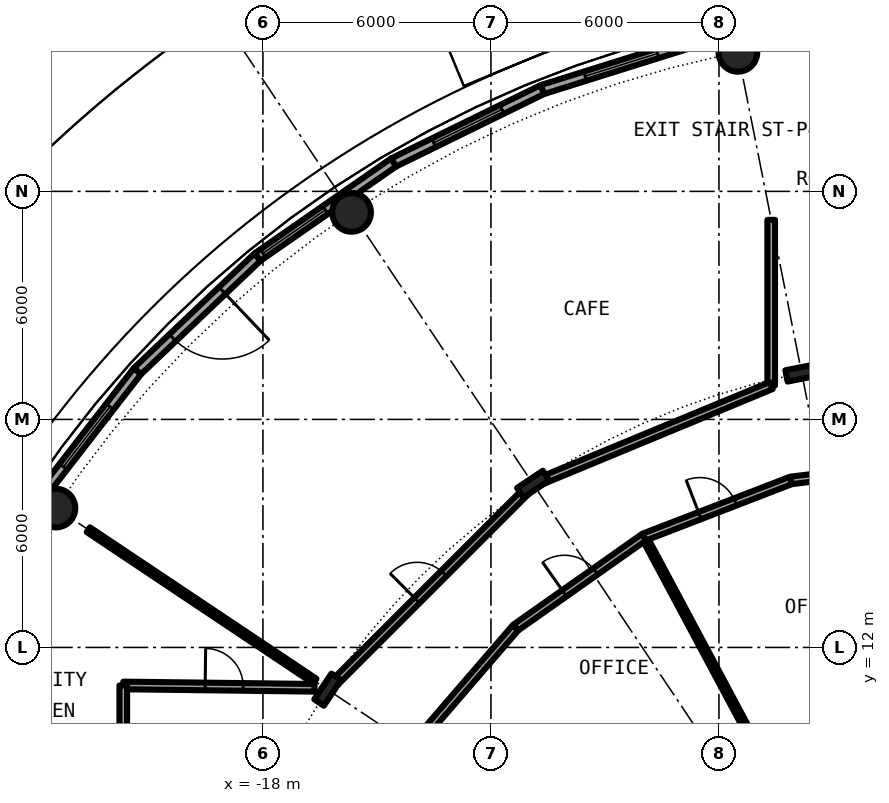
"""IFC4 building model, lengths in metres.
Left out: names, types, materials, properties, quantities, classifications, styles, units other than length and angle.
Written with IfcOpenShell. Run it as: python <this file> out.ifc"""

import sys

from ifc_helpers import new_model, si_unit, direction, frame, frame_2d, origin, origin_2d, place, context, subcontext, project, spatial, rectangle, hollow_circle, i_section, extrude, element, fill, save


model = new_model("IFC4")
c1 = context("Model", 3, precision=1e-05, world=origin(), true_north=direction((0.0, 1.0)))
c2 = subcontext(c1, "Body", "Model", "MODEL_VIEW")
j1 = project(units=[si_unit("LENGTHUNIT", "METRE"), si_unit("PLANEANGLEUNIT", "RADIAN")], contexts=[c1])
p1 = place(None, origin())
s1 = spatial("IfcSite", under=j1, at=p1, CompositionType="ELEMENT")
p2 = place(p1, origin())
s2 = spatial("IfcBuilding", under=s1, at=p2, CompositionType="ELEMENT")
p3 = place(p2, frame((0.0, 0.0, 9.6)))
s3 = spatial("IfcBuildingStorey", under=s2, at=p3, CompositionType="ELEMENT", Elevation=9.6)
for number, where, z_axis, x_axis in (
    (1, (-5.501, 27.658, 0.0), (0.0, 0.0, 1.0), (1.0, 0.0, 0.0)),
    (2, (-15.667, 23.448, 0.0), (0.0, 0.0, 1.0), (1.0, 0.0, 0.0)),
    (3, (-23.448, 15.667, 0.0), (0.0, 0.0, 1.0), (1.0, 0.0, 0.0)),
):
    element("IfcColumn", number, at=place(p3, frame(where, z_axis=z_axis, x_axis=x_axis)), inside=s3, PredefinedType="COLUMN", context=c2, shape_type="SweptSolid", body=[
        extrude(hollow_circle(Radius=0.508, WallThickness=0.05, at=origin_2d()), origin(), (0.0, 0.0, 1.0), 4.5),
    ])
for number, where, z_axis, x_axis in (
    (4, (-3.824, 19.223, 0.0), (0.0, 0.0, 1.0), (-0.195, 0.981, 0.0)),
    (5, (-10.889, 16.297, 0.0), (0.0, 0.0, 1.0), (-0.556, 0.831, 0.0)),
    (6, (-16.297, 10.889, 0.0), (0.0, 0.0, 1.0), (-0.831, 0.556, 0.0)),
):
    element("IfcColumn", number, at=place(p3, frame(where, z_axis=z_axis, x_axis=x_axis)), inside=s3, PredefinedType="COLUMN", context=c2, shape_type="SweptSolid", body=[
        extrude(i_section(OverallWidth=0.303, OverallDepth=0.814, WebThickness=0.021, FlangeThickness=0.04, FilletRadius=0.03, at=origin_2d()), origin(), (0.0, 0.0, 1.0), 4.5),
    ])
p4 = place(p3, frame((-6.489, 27.982, 0.0), z_axis=(0.0, 0.0, 1.0), x_axis=(-0.954219534331, -0.299107138498, 0.0)))
e7 = element("IfcWall", 7, at=p4, inside=s3, PredefinedType="SOLIDWALL", context=c2, shape_type="SweptSolid", body=[
    extrude(rectangle(XDim=4.359, YDim=0.25, at=frame_2d((2.18, 0.0))), origin(), (0.0, 0.0, 1.0), 4.05),
])
p5 = place(p4, frame((1.18, 0.0, 0.9)))
e8 = element("IfcOpeningElement", 8, at=p5, cuts=e7, PredefinedType="OPENING", context=c2, shape_type="SweptSolid", body=[
    extrude(rectangle(XDim=2.0, YDim=2.4, at=frame_2d((1.0, 1.2))), frame((0.0, 0.135, 0.0), z_axis=(0.0, -1.0, 0.0), x_axis=(1.0, 0.0, 0.0)), (0.0, 0.0, 1.0), 0.27),
])
p6 = place(p3, frame((-10.649, 26.678, 0.0), z_axis=(0.0, 0.0, 1.0), x_axis=(-0.897938079481, -0.440121807478, 0.0)))
e9 = element("IfcWall", 9, at=p6, inside=s3, PredefinedType="SOLIDWALL", context=c2, shape_type="SweptSolid", body=[
    extrude(rectangle(XDim=4.36, YDim=0.25, at=frame_2d((2.18, 0.0))), origin(), (0.0, 0.0, 1.0), 4.05),
])
p7 = place(p6, frame((1.18, 0.0, 0.9)))
e10 = element("IfcOpeningElement", 10, at=p7, cuts=e9, PredefinedType="OPENING", context=c2, shape_type="SweptSolid", body=[
    extrude(rectangle(XDim=2.0, YDim=2.4, at=frame_2d((1.0, 1.2))), frame((0.0, 0.135, 0.0), z_axis=(0.0, -1.0, 0.0), x_axis=(1.0, 0.0, 0.0)), (0.0, 0.0, 1.0), 0.27),
])
p8 = place(p3, frame((-14.564, 24.759, 0.0), z_axis=(0.0, 0.0, 1.0), x_axis=(-0.820990800869, -0.57094141984, 0.0)))
e11 = element("IfcWall", 11, at=p8, inside=s3, PredefinedType="SOLIDWALL", context=c2, shape_type="SweptSolid", body=[
    extrude(rectangle(XDim=4.359, YDim=0.25, at=frame_2d((2.18, 0.0))), origin(), (0.0, 0.0, 1.0), 4.05),
])
p9 = place(p8, frame((2.183, 0.0, 0.9)))
e12 = element("IfcOpeningElement", 12, at=p9, cuts=e11, PredefinedType="OPENING", context=c2, shape_type="SweptSolid", body=[
    extrude(rectangle(XDim=2.0, YDim=2.4, at=frame_2d((1.0, 1.2))), frame((0.0, 0.135, 0.0), z_axis=(0.0, -1.0, 0.0), x_axis=(1.0, 0.0, 0.0)), (0.0, 0.0, 1.0), 0.27),
])
p10 = place(p3, frame((-18.143, 22.27, 0.0), z_axis=(0.0, 0.0, 1.0), x_axis=(-0.725101501119, -0.68864200647, 0.0)))
e13 = element("IfcWall", 13, at=p10, inside=s3, PredefinedType="SOLIDWALL", context=c2, shape_type="SweptSolid", body=[
    extrude(rectangle(XDim=4.359, YDim=0.25, at=frame_2d((2.18, 0.0))), origin(), (0.0, 0.0, 1.0), 4.05),
])
p11 = place(p10, frame((1.28, 0.0, 0.0)))
e14 = element("IfcOpeningElement", 14, at=p11, cuts=e13, PredefinedType="OPENING", context=c2, shape_type="SweptSolid", body=[
    extrude(rectangle(XDim=1.8, YDim=2.2, at=frame_2d((0.9, 1.1))), frame((0.0, 0.135, 0.0), z_axis=(0.0, -1.0, 0.0), x_axis=(1.0, 0.0, 0.0)), (0.0, 0.0, 1.0), 0.27),
])
p12 = place(p3, frame((-21.304, 19.268, 0.0), z_axis=(0.0, 0.0, 1.0), x_axis=(-0.612637256412, -0.790364214812, 0.0)))
e15 = element("IfcWall", 15, at=p12, inside=s3, PredefinedType="SOLIDWALL", context=c2, shape_type="SweptSolid", body=[
    extrude(rectangle(XDim=4.36, YDim=0.25, at=frame_2d((2.18, 0.0))), origin(), (0.0, 0.0, 1.0), 4.05),
])
p13 = place(p12, frame((1.18, 0.0, 0.9)))
e16 = element("IfcOpeningElement", 16, at=p13, cuts=e15, PredefinedType="OPENING", context=c2, shape_type="SweptSolid", body=[
    extrude(rectangle(XDim=2.0, YDim=2.4, at=frame_2d((1.0, 1.2))), frame((0.0, 0.135, 0.0), z_axis=(0.0, -1.0, 0.0), x_axis=(1.0, 0.0, 0.0)), (0.0, 0.0, 1.0), 0.27),
])
p14 = place(p3, frame((-22.595, 15.098, 0.0), z_axis=(0.0, 0.0, 1.0), x_axis=(0.831431488123, -0.555627285648, 0.0)))
e17 = element("IfcWall", 17, at=p14, inside=s3, PredefinedType="PARTITIONING", context=c2, shape_type="SweptSolid", body=[
    extrude(rectangle(XDim=7.168, YDim=0.15, at=frame_2d((3.584, 0.0))), origin(), (0.0, 0.0, 1.0), 4.05),
])
p15 = place(p3, frame((-7.968, 14.904, 0.0), z_axis=(0.0, 0.0, 1.0), x_axis=(0.471460365694, -0.881887251059, 0.0)))
e18 = element("IfcWall", 18, at=p15, inside=s3, PredefinedType="PARTITIONING", context=c2, shape_type="SweptSolid", body=[
    extrude(rectangle(XDim=9.18, YDim=0.15, at=frame_2d((4.59, 0.0))), origin(), (0.0, 0.0, 1.0), 4.05),
])
p16 = place(p3, frame((-4.625, 18.891, 0.0), z_axis=(0.0, 0.0, 1.0), x_axis=(0.0, 1.0, 0.0)))
e19 = element("IfcWall", 19, at=p16, inside=s3, PredefinedType="PARTITIONING", context=c2, shape_type="SweptSolid", body=[
    extrude(rectangle(XDim=4.359, YDim=0.2, at=frame_2d((2.179, 0.0))), origin(), (0.0, 0.0, 1.0), 4.05),
])
p17 = place(p3, frame((-21.675, 11.0, 0.0), z_axis=(0.0, 0.0, 1.0), x_axis=(0.999924074118, -0.012322580895, 0.0)))
e20 = element("IfcWall", 20, at=p17, inside=s3, PredefinedType="PARTITIONING", context=c2, shape_type="SweptSolid", body=[
    extrude(rectangle(XDim=5.032, YDim=0.2, at=frame_2d((2.516, 0.0))), origin(), (0.0, 0.0, 1.0), 4.05),
])
p18 = place(p17, frame((2.155, 0.0, 0.0)))
e21 = element("IfcOpeningElement", 21, at=p18, cuts=e20, PredefinedType="OPENING", context=c2, shape_type="SweptSolid", body=[
    extrude(rectangle(XDim=1.0, YDim=2.3, at=frame_2d((0.5, 1.15))), frame((0.0, 0.11, 0.0), z_axis=(0.0, -1.0, 0.0), x_axis=(1.0, 0.0, 0.0)), (0.0, 0.0, 1.0), 0.22),
])
p19 = place(p3, frame((-14.043, 9.4, 0.0), z_axis=(0.0, 0.0, 1.0), x_axis=(0.653274518104, 0.757121129012, 0.0)))
e22 = element("IfcWall", 22, at=p19, inside=s3, PredefinedType="PARTITIONING", context=c2, shape_type="SweptSolid", body=[
    extrude(rectangle(XDim=4.124, YDim=0.2, at=frame_2d((2.062, 0.0))), origin(), (0.0, 0.0, 1.0), 4.05),
])
p20 = place(p3, frame((-11.349, 12.522, 0.0), z_axis=(0.0, 0.0, 1.0), x_axis=(0.817567680547, 0.575832517079, 0.0)))
e23 = element("IfcWall", 23, at=p20, inside=s3, PredefinedType="PARTITIONING", context=c2, shape_type="SweptSolid", body=[
    extrude(rectangle(XDim=4.137, YDim=0.2, at=frame_2d((2.068, 0.0))), origin(), (0.0, 0.0, 1.0), 4.05),
])
p21 = place(p20, frame((1.568, 0.0, 0.0)))
e24 = element("IfcOpeningElement", 24, at=p21, cuts=e23, PredefinedType="OPENING", context=c2, shape_type="SweptSolid", body=[
    extrude(rectangle(XDim=1.0, YDim=2.3, at=frame_2d((0.5, 1.15))), frame((0.0, 0.11, 0.0), z_axis=(0.0, -1.0, 0.0), x_axis=(1.0, 0.0, 0.0)), (0.0, 0.0, 1.0), 0.22),
])
p22 = place(p3, frame((-7.967, 14.904, 0.0), z_axis=(0.0, 0.0, 1.0), x_axis=(0.932943640288, 0.360022449363, 0.0)))
e25 = element("IfcWall", 25, at=p22, inside=s3, PredefinedType="PARTITIONING", context=c2, shape_type="SweptSolid", body=[
    extrude(rectangle(XDim=4.139, YDim=0.2, at=frame_2d((2.069, 0.0))), origin(), (0.0, 0.0, 1.0), 4.05),
])
p23 = place(p22, frame((1.569, 0.0, 0.0)))
e26 = element("IfcOpeningElement", 26, at=p23, cuts=e25, PredefinedType="OPENING", context=c2, shape_type="SweptSolid", body=[
    extrude(rectangle(XDim=1.0, YDim=2.3, at=frame_2d((0.5, 1.15))), frame((0.0, 0.11, 0.0), z_axis=(0.0, -1.0, 0.0), x_axis=(1.0, 0.0, 0.0)), (0.0, 0.0, 1.0), 0.22),
])
p24 = place(p3, frame((-4.106, 16.394, 0.0), z_axis=(0.0, 0.0, 1.0), x_axis=(0.992496033272, 0.122276833211, 0.0)))
e27 = element("IfcWall", 27, at=p24, inside=s3, PredefinedType="PARTITIONING", context=c2, shape_type="SweptSolid", body=[
    extrude(rectangle(XDim=4.137, YDim=0.2, at=frame_2d((2.068, 0.0))), origin(), (0.0, 0.0, 1.0), 4.05),
])
p25 = place(p3, frame((-16.188, 10.998, 0.0), z_axis=(0.0, 0.0, 1.0), x_axis=(0.707106781187, 0.707106781187, 0.0)))
e28 = element("IfcWall", 28, at=p25, inside=s3, PredefinedType="PARTITIONING", context=c2, shape_type="SweptSolid", body=[
    extrude(rectangle(XDim=7.34, YDim=0.2, at=frame_2d((3.67, 0.0))), origin(), (0.0, 0.0, 1.0), 3.63),
])
p26 = place(p25, frame((3.17, 0.0, 0.0)))
e29 = element("IfcOpeningElement", 29, at=p26, cuts=e28, PredefinedType="OPENING", context=c2, shape_type="SweptSolid", body=[
    extrude(rectangle(XDim=1.0, YDim=2.3, at=frame_2d((0.5, 1.15))), frame((0.0, 0.11, 0.0), z_axis=(0.0, -1.0, 0.0), x_axis=(1.0, 0.0, 0.0)), (0.0, 0.0, 1.0), 0.22),
])
p27 = place(p3, frame((-10.747, 16.356, 0.0), z_axis=(0.0, 0.0, 1.0), x_axis=(0.923916253875, 0.382594767117, 0.0)))
e30 = element("IfcWall", 30, at=p27, inside=s3, PredefinedType="PARTITIONING", context=c2, shape_type="SweptSolid", body=[
    extrude(rectangle(XDim=6.626, YDim=0.2, at=frame_2d((3.313, 0.0))), origin(), (0.0, 0.0, 1.0), 3.63),
])
p28 = place(p3, frame((-21.675, 9.4, 0.0), z_axis=(0.0, 0.0, 1.0), x_axis=(0.0, 1.0, 0.0)))
e31 = element("IfcWall", 31, at=p28, inside=s3, PredefinedType="PARTITIONING", context=c2, shape_type="SweptSolid", body=[
    extrude(rectangle(XDim=1.6, YDim=0.2, at=frame_2d((0.8, 0.0))), origin(), (0.0, 0.0, 1.0), 4.05),
])
p29 = place(p5, origin())
e32 = element("IfcWindow", 32, at=p29, inside=s3, PartitioningType="SINGLE_PANEL", PredefinedType="WINDOW", context=c2, shape_type="SweptSolid", body=[
    extrude(rectangle(XDim=2.0, YDim=2.4, at=frame_2d((1.0, 1.2))), frame((0.0, 0.03, 0.0), z_axis=(0.0, -1.0, 0.0), x_axis=(1.0, 0.0, 0.0)), (0.0, 0.0, 1.0), 0.06),
])
fill(e8, e32)
p30 = place(p7, origin())
e33 = element("IfcWindow", 33, at=p30, inside=s3, PartitioningType="SINGLE_PANEL", PredefinedType="WINDOW", context=c2, shape_type="SweptSolid", body=[
    extrude(rectangle(XDim=2.0, YDim=2.4, at=frame_2d((1.0, 1.2))), frame((0.0, 0.03, 0.0), z_axis=(0.0, -1.0, 0.0), x_axis=(1.0, 0.0, 0.0)), (0.0, 0.0, 1.0), 0.06),
])
fill(e10, e33)
p31 = place(p9, origin())
e34 = element("IfcWindow", 34, at=p31, inside=s3, PartitioningType="SINGLE_PANEL", PredefinedType="WINDOW", context=c2, shape_type="SweptSolid", body=[
    extrude(rectangle(XDim=2.0, YDim=2.4, at=frame_2d((1.0, 1.2))), frame((0.0, 0.03, 0.0), z_axis=(0.0, -1.0, 0.0), x_axis=(1.0, 0.0, 0.0)), (0.0, 0.0, 1.0), 0.06),
])
fill(e12, e34)
p32 = place(p11, origin())
e35 = element("IfcDoor", 35, at=p32, inside=s3, OperationType="SINGLE_SWING_LEFT", PredefinedType="DOOR", context=c2, shape_type="SweptSolid", body=[
    extrude(rectangle(XDim=1.8, YDim=2.2, at=frame_2d((0.9, 1.1))), frame((0.0, 0.025, 0.0), z_axis=(0.0, -1.0, 0.0), x_axis=(1.0, 0.0, 0.0)), (0.0, 0.0, 1.0), 0.05),
])
fill(e14, e35)
p33 = place(p13, origin())
e36 = element("IfcWindow", 36, at=p33, inside=s3, PartitioningType="SINGLE_PANEL", PredefinedType="WINDOW", context=c2, shape_type="SweptSolid", body=[
    extrude(rectangle(XDim=2.0, YDim=2.4, at=frame_2d((1.0, 1.2))), frame((0.0, 0.03, 0.0), z_axis=(0.0, -1.0, 0.0), x_axis=(1.0, 0.0, 0.0)), (0.0, 0.0, 1.0), 0.06),
])
fill(e16, e36)
p34 = place(p26, origin())
e37 = element("IfcDoor", 37, at=p34, inside=s3, OperationType="SINGLE_SWING_RIGHT", PredefinedType="DOOR", context=c2, shape_type="SweptSolid", body=[
    extrude(rectangle(XDim=1.0, YDim=2.3, at=frame_2d((0.5, 1.15))), frame((0.0, 0.025, 0.0), z_axis=(0.0, -1.0, 0.0), x_axis=(1.0, 0.0, 0.0)), (0.0, 0.0, 1.0), 0.05),
])
fill(e29, e37)
p35 = place(p23, origin())
e38 = element("IfcDoor", 38, at=p35, inside=s3, OperationType="SINGLE_SWING_RIGHT", PredefinedType="DOOR", context=c2, shape_type="SweptSolid", body=[
    extrude(rectangle(XDim=1.0, YDim=2.3, at=frame_2d((0.5, 1.15))), frame((0.0, 0.025, 0.0), z_axis=(0.0, -1.0, 0.0), x_axis=(1.0, 0.0, 0.0)), (0.0, 0.0, 1.0), 0.05),
])
fill(e26, e38)
p36 = place(p21, origin())
e39 = element("IfcDoor", 39, at=p36, inside=s3, OperationType="SINGLE_SWING_RIGHT", PredefinedType="DOOR", context=c2, shape_type="SweptSolid", body=[
    extrude(rectangle(XDim=1.0, YDim=2.3, at=frame_2d((0.5, 1.15))), frame((0.0, 0.025, 0.0), z_axis=(0.0, -1.0, 0.0), x_axis=(1.0, 0.0, 0.0)), (0.0, 0.0, 1.0), 0.05),
])
fill(e24, e39)
p37 = place(p18, origin())
e40 = element("IfcDoor", 40, at=p37, inside=s3, OperationType="SINGLE_SWING_RIGHT", PredefinedType="DOOR", context=c2, shape_type="SweptSolid", body=[
    extrude(rectangle(XDim=1.0, YDim=2.3, at=frame_2d((0.5, 1.15))), frame((0.0, 0.025, 0.0), z_axis=(0.0, -1.0, 0.0), x_axis=(1.0, 0.0, 0.0)), (0.0, 0.0, 1.0), 0.05),
])
fill(e21, e40)
save(model, sys.argv[1])
